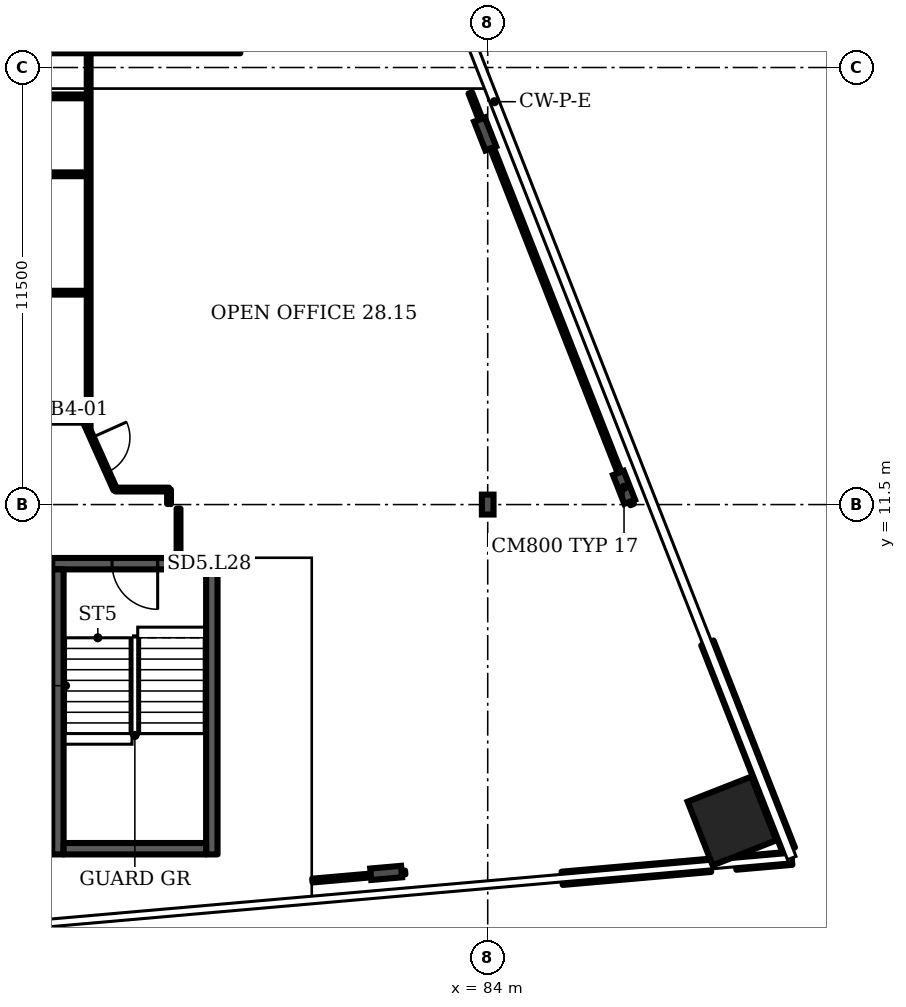
"""IFC4 building model, lengths in metres.
Left out: names, types, materials, properties, quantities, classifications, styles, units other than length and angle.
Written with IfcOpenShell. Run it as: python <this file> out.ifc"""

import sys

from ifc_helpers import new_model, si_unit, direction, frame, frame_2d, origin, origin_2d, place, context, subcontext, project, spatial, rectangle, i_section, extrude, element, fill, save


model = new_model("IFC4")
c1 = context("Model", 3, precision=1e-05, world=origin(), true_north=direction((0.0, 1.0)))
c2 = subcontext(c1, "Body", "Model", "MODEL_VIEW")
j1 = project(units=[si_unit("LENGTHUNIT", "METRE"), si_unit("PLANEANGLEUNIT", "RADIAN")], contexts=[c1])
p1 = place(None, origin())
s1 = spatial("IfcSite", under=j1, at=p1, CompositionType="ELEMENT")
p2 = place(p1, origin())
s2 = spatial("IfcBuilding", under=s1, at=p2, CompositionType="ELEMENT")
p3 = place(p2, frame((0.0, 0.0, 121.9)))
s3 = spatial("IfcBuildingStorey", under=s2, at=p3, CompositionType="ELEMENT", Elevation=121.9)
p4 = place(p3, frame((90.427, 3.174, 0.0), z_axis=(0.0, 0.0, 1.0), x_axis=(-0.365778, 0.930702, 0.0)))
e1 = element("IfcColumn", 1, at=p4, inside=s3, PredefinedType="COLUMN", context=c2, shape_type="SweptSolid", body=[
    extrude(rectangle(XDim=1.8, YDim=1.8, at=origin_2d()), origin(), (0.0, 0.0, 1.0), 3.6),
])
for number, where, z_axis, x_axis in (
    (2, (81.328, 1.808, 0.0), (0.0, 0.0, 1.0), (0.087, -0.996, 0.0)),
    (3, (87.587, 11.952, 0.0), (0.0, 0.0, 1.0), (0.931, 0.366, 0.0)),
    (4, (83.933, 21.251, 0.0), (0.0, 0.0, 1.0), (0.931, 0.366, 0.0)),
):
    element("IfcColumn", number, at=place(p3, frame(where, z_axis=z_axis, x_axis=x_axis)), inside=s3, PredefinedType="COLUMN", context=c2, shape_type="SweptSolid", body=[
        extrude(i_section(OverallWidth=0.303, OverallDepth=0.814, WebThickness=0.021, FlangeThickness=0.04, FilletRadius=0.03, at=origin_2d()), origin(), (0.0, 0.0, 1.0), 3.6),
    ])
p5 = place(p3, frame((84.0, 11.5, 0.0), z_axis=(0.0, 0.0, 1.0), x_axis=(1.0, 0.0, 0.0)))
e5 = element("IfcColumn", 5, at=p5, inside=s3, PredefinedType="COLUMN", context=c2, shape_type="SweptSolid", body=[
    extrude(i_section(OverallWidth=0.306, OverallDepth=0.524, WebThickness=0.021, FlangeThickness=0.04, FilletRadius=0.027, at=origin_2d()), origin(), (0.0, 0.0, 1.0), 3.6),
])
p6 = place(p3, frame((85.959, 1.667, 0.0), z_axis=(0.0, 0.0, 1.0), x_axis=(0.996194, 0.087167, 0.0)))
e6 = element("IfcWall", 6, at=p6, inside=s3, PredefinedType="SOLIDWALL", context=c2, shape_type="SweptSolid", body=[
    extrude(rectangle(XDim=3.921, YDim=0.35, at=frame_2d((1.96, 0.0))), origin(), (0.0, 0.0, 1.0), 1.0),
])
p7 = place(p3, frame((90.527, 2.066, 0.0), z_axis=(0.0, 0.0, 1.0), x_axis=(0.996198, 0.087157, 0.0)))
e7 = element("IfcWall", 7, at=p7, inside=s3, PredefinedType="SOLIDWALL", context=c2, shape_type="SweptSolid", body=[
    extrude(rectangle(XDim=1.479, YDim=0.35, at=frame_2d((0.74, 0.0))), origin(), (0.0, 0.0, 1.0), 1.0),
])
p8 = place(p3, frame((91.921, 2.414, 0.0), z_axis=(0.0, 0.0, 1.0), x_axis=(-0.36578, 0.930701, 0.0)))
e8 = element("IfcWall", 8, at=p8, inside=s3, PredefinedType="SOLIDWALL", context=c2, shape_type="SweptSolid", body=[
    extrude(rectangle(XDim=5.852, YDim=0.35, at=frame_2d((2.926, 0.0))), origin(), (0.0, 0.0, 1.0), 1.0),
])
p9 = place(p3, frame((72.541, 9.945, 0.0), z_axis=(0.0, 0.0, 1.0), x_axis=(1.0, 0.0, 0.0)))
e9 = element("IfcWall", 9, at=p9, inside=s3, PredefinedType="SHEAR", context=c2, shape_type="SweptSolid", body=[
    extrude(rectangle(XDim=4.35, YDim=0.3, at=frame_2d((2.175, 0.0))), origin(), (0.0, 0.0, 1.0), 3.2),
])
p10 = place(p9, frame((1.575, 0.0, 0.0)))
e10 = element("IfcOpeningElement", 10, at=p10, cuts=e9, PredefinedType="OPENING", context=c2, shape_type="SweptSolid", body=[
    extrude(rectangle(XDim=1.2, YDim=2.1, at=frame_2d((0.6, 1.05))), frame((0.0, 0.16, 0.0), z_axis=(0.0, -1.0, 0.0), x_axis=(1.0, 0.0, 0.0)), (0.0, 0.0, 1.0), 0.32),
])
p11 = place(p3, frame((65.91, 13.705, 0.0), z_axis=(0.0, 0.0, 1.0), x_axis=(1.0, 0.0, 0.0)))
e11 = element("IfcWall", 11, at=p11, inside=s3, PredefinedType="PARTITIONING", context=c2, shape_type="SweptSolid", body=[
    extrude(rectangle(XDim=7.49, YDim=0.1, at=frame_2d((3.745, 0.0))), origin(), (0.0, 0.0, 1.0), 3.2),
])
p12 = place(p3, frame((65.91, 22.24, 0.0), z_axis=(0.0, 0.0, 1.0), x_axis=(1.0, 0.0, 0.0)))
e12 = element("IfcWall", 12, at=p12, inside=s3, PredefinedType="PARTITIONING", context=c2, shape_type="SweptSolid", body=[
    extrude(rectangle(XDim=7.59, YDim=0.1, at=frame_2d((3.795, 0.0))), origin(), (0.0, 0.0, 1.0), 3.2),
])
for number, where, z_axis, x_axis in (
    (13, (67.71, 17.075, 0.0), (0.0, 0.0, 1.0), (1.0, 0.0, 0.0)),
    (14, (67.71, 20.19, 0.0), (0.0, 0.0, 1.0), (1.0, 0.0, 0.0)),
):
    element("IfcWall", number, at=place(p3, frame(where, z_axis=z_axis, x_axis=x_axis)), inside=s3, PredefinedType="PARTITIONING", context=c2, shape_type="SweptSolid", body=[
        extrude(rectangle(XDim=5.79, YDim=0.1, at=frame_2d((2.895, 0.0))), origin(), (0.0, 0.0, 1.0), 3.2),
    ])
p13 = place(p3, frame((73.49, 13.48, 0.0), z_axis=(0.0, 0.0, 1.0), x_axis=(-0.419275, 0.907861, 0.0)))
e15 = element("IfcWall", 15, at=p13, inside=s3, PredefinedType="PARTITIONING", context=c2, shape_type="SweptSolid", body=[
    extrude(rectangle(XDim=0.215, YDim=0.1, at=frame_2d((0.107, 0.0))), origin(), (0.0, 0.0, 1.0), 3.2),
])
p14 = place(p3, frame((73.5, 13.48, 0.0), z_axis=(0.0, 0.0, 1.0), x_axis=(0.0, 1.0, 0.0)))
e16 = element("IfcWall", 16, at=p14, inside=s3, PredefinedType="PARTITIONING", context=c2, shape_type="SweptSolid", body=[
    extrude(rectangle(XDim=9.895, YDim=0.1, at=frame_2d((4.948, 0.0))), origin(), (0.0, 0.0, 1.0), 3.2),
])
p15 = place(p3, frame((74.2, 11.895, 0.0), z_axis=(0.0, 0.0, 1.0), x_axis=(-0.409356, 0.912377, 0.0)))
e17 = element("IfcWall", 17, at=p15, inside=s3, PredefinedType="PARTITIONING", context=c2, shape_type="SweptSolid", body=[
    extrude(rectangle(XDim=1.71, YDim=0.1, at=frame_2d((0.855, 0.0))), origin(), (0.0, 0.0, 1.0), 3.2),
])
p16 = place(p15, frame((0.5, 0.0, 0.0)))
e18 = element("IfcOpeningElement", 18, at=p16, cuts=e17, PredefinedType="OPENING", context=c2, shape_type="SweptSolid", body=[
    extrude(rectangle(XDim=1.0, YDim=2.1, at=frame_2d((0.5, 1.05))), frame((0.0, 0.06, 0.0), z_axis=(0.0, -1.0, 0.0), x_axis=(1.0, 0.0, 0.0)), (0.0, 0.0, 1.0), 0.12),
])
p17 = place(p3, frame((74.2, 11.895, 0.0), z_axis=(0.0, 0.0, 1.0), x_axis=(1.0, 0.0, 0.0)))
e19 = element("IfcWall", 19, at=p17, inside=s3, PredefinedType="PARTITIONING", context=c2, shape_type="SweptSolid", body=[
    extrude(rectangle(XDim=1.415, YDim=0.1, at=frame_2d((0.708, 0.0))), origin(), (0.0, 0.0, 1.0), 3.2),
])
p18 = place(p3, frame((75.615, 11.515, 0.0), z_axis=(0.0, 0.0, 1.0), x_axis=(0.0, 1.0, 0.0)))
e20 = element("IfcWall", 20, at=p18, inside=s3, PredefinedType="PARTITIONING", context=c2, shape_type="SweptSolid", body=[
    extrude(rectangle(XDim=0.38, YDim=0.1, at=frame_2d((0.19, 0.0))), origin(), (0.0, 0.0, 1.0), 3.2),
])
p19 = place(p3, frame((75.865, 10.115, 0.0), z_axis=(0.0, 0.0, 1.0), x_axis=(0.0, 1.0, 0.0)))
e21 = element("IfcWall", 21, at=p19, inside=s3, PredefinedType="PARTITIONING", context=c2, shape_type="SweptSolid", body=[
    extrude(rectangle(XDim=1.28, YDim=0.1, at=frame_2d((0.64, 0.0))), origin(), (0.0, 0.0, 1.0), 3.2),
])
p20 = place(p3, frame((79.386, 1.607, 0.0), z_axis=(0.0, 0.0, 1.0), x_axis=(0.996209, 0.086973, 0.0)))
e22 = element("IfcWall", 22, at=p20, inside=s3, PredefinedType="PARTITIONING", context=c2, shape_type="SweptSolid", body=[
    extrude(rectangle(XDim=2.453, YDim=0.1, at=frame_2d((1.227, 0.0))), origin(), (0.0, 0.0, 1.0), 2.58),
])
p21 = place(p3, frame((87.8, 11.5, 0.0), z_axis=(0.0, 0.0, 1.0), x_axis=(-0.365866, 0.930668, 0.0)))
e23 = element("IfcWall", 23, at=p21, inside=s3, PredefinedType="PARTITIONING", context=c2, shape_type="SweptSolid", body=[
    extrude(rectangle(XDim=11.64, YDim=0.1, at=frame_2d((5.82, 0.0))), origin(), (0.0, 0.0, 1.0), 2.58),
])
for number, where, z_axis, x_axis in (
    (24, (72.691, 2.295, 0.0), (0.0, 0.0, 1.0), (0.0, 1.0, 0.0)),
    (25, (76.741, 2.295, 0.0), (0.0, 0.0, 1.0), (0.0, 1.0, 0.0)),
):
    element("IfcWall", number, at=place(p3, frame(where, z_axis=z_axis, x_axis=x_axis)), inside=s3, PredefinedType="SHEAR", context=c2, shape_type="SweptSolid", body=[
        extrude(rectangle(XDim=7.5, YDim=0.3, at=frame_2d((3.75, 0.0))), origin(), (0.0, 0.0, 1.0), 3.2),
    ])
p22 = place(p3, frame((72.841, 2.445, 0.0), z_axis=(0.0, 0.0, 1.0), x_axis=(1.0, 0.0, 0.0)))
e26 = element("IfcWall", 26, at=p22, inside=s3, PredefinedType="SHEAR", context=c2, shape_type="SweptSolid", body=[
    extrude(rectangle(XDim=3.75, YDim=0.3, at=frame_2d((1.875, 0.0))), origin(), (0.0, 0.0, 1.0), 3.2),
])
p23 = place(p3, frame((69.99, 23.525, 0.0), z_axis=(0.0, 0.0, 1.0), x_axis=(1.0, 0.0, 0.0)))
e27 = element("IfcWall", 27, at=p23, inside=s3, PredefinedType="SHEAR", context=c2, shape_type="SweptSolid", body=[
    extrude(rectangle(XDim=7.5, YDim=0.3, at=frame_2d((3.75, 0.0))), origin(), (0.0, 0.0, 1.0), 3.2),
])
p24 = place(p10, origin())
e28 = element("IfcDoor", 28, at=p24, inside=s3, OperationType="SINGLE_SWING_RIGHT", PredefinedType="DOOR", context=c2, shape_type="SweptSolid", body=[
    extrude(rectangle(XDim=1.2, YDim=2.1, at=frame_2d((0.6, 1.05))), frame((0.0, 0.025, 0.0), z_axis=(0.0, -1.0, 0.0), x_axis=(1.0, 0.0, 0.0)), (0.0, 0.0, 1.0), 0.05),
])
fill(e10, e28)
p25 = place(p16, origin())
e29 = element("IfcDoor", 29, at=p25, inside=s3, OperationType="SINGLE_SWING_RIGHT", PredefinedType="DOOR", context=c2, shape_type="SweptSolid", body=[
    extrude(rectangle(XDim=1.0, YDim=2.1, at=frame_2d((0.5, 1.05))), frame((0.0, 0.025, 0.0), z_axis=(0.0, -1.0, 0.0), x_axis=(1.0, 0.0, 0.0)), (0.0, 0.0, 1.0), 0.05),
])
fill(e18, e29)
save(model, sys.argv[1])
